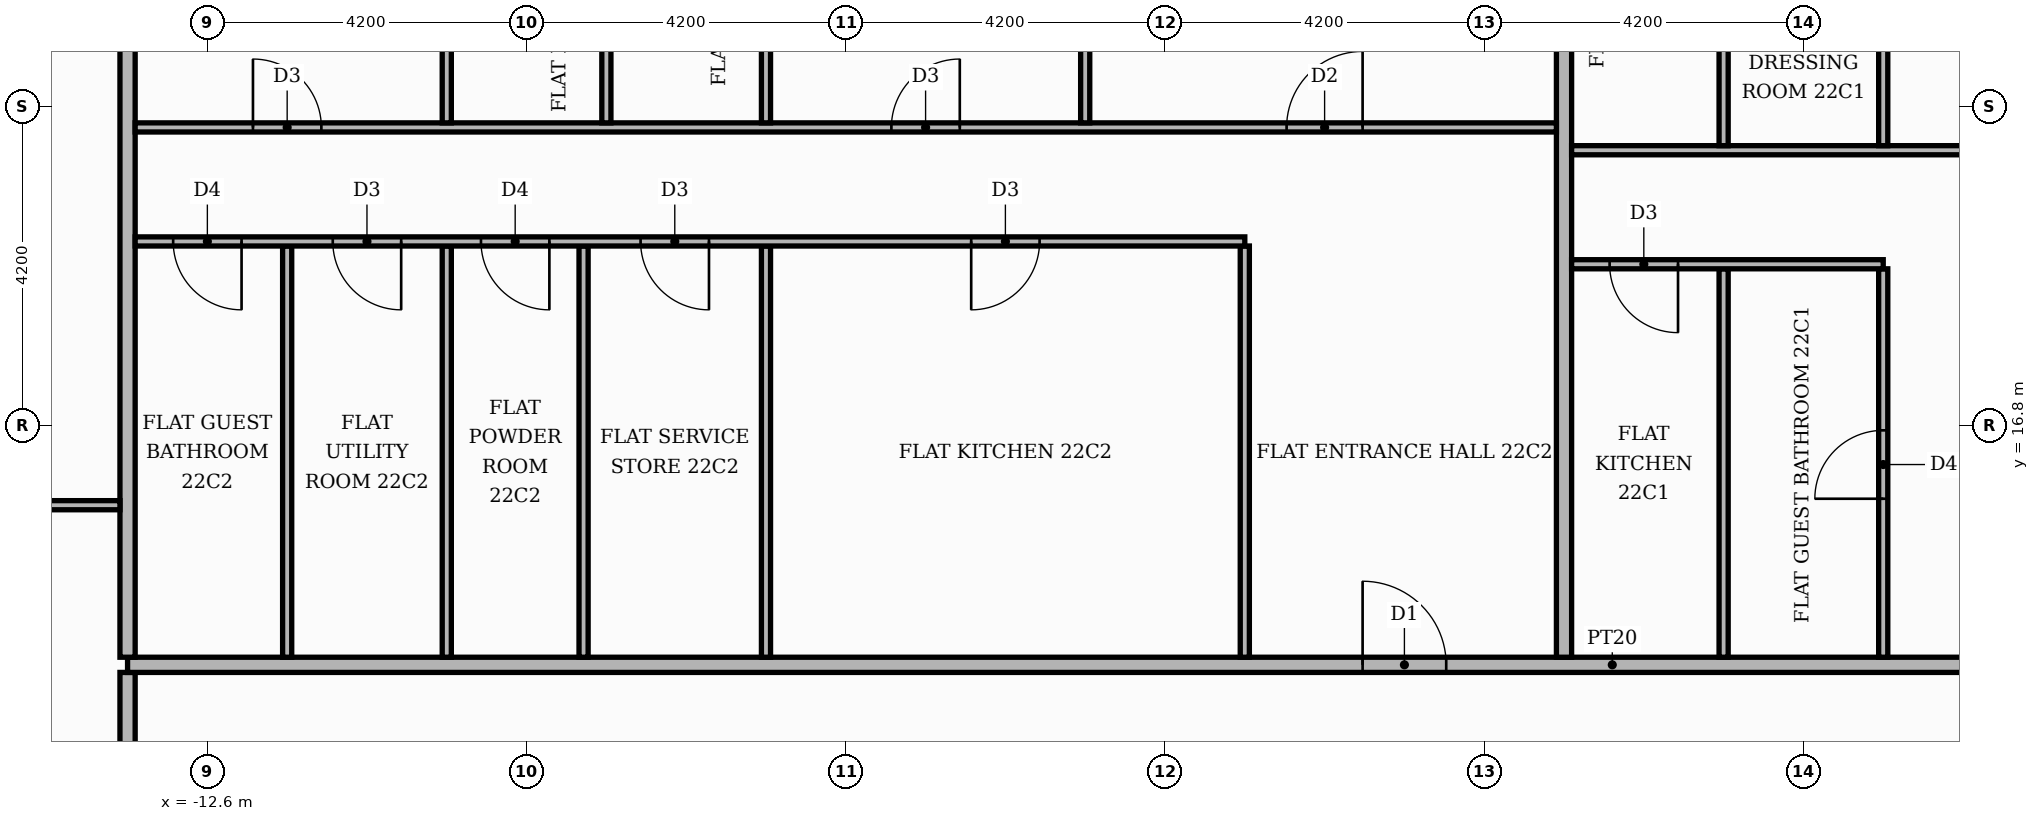
"""IFC4 building model, lengths in metres.
Left out: names, types, materials, properties, quantities, classifications, styles, units other than length and angle.
Written with IfcOpenShell. Run it as: python <this file> out.ifc"""

import sys

from ifc_helpers import new_model, si_unit, direction, frame, frame_2d, origin, place, context, subcontext, project, spatial, rectangle, extrude, element, fill, save


model = new_model("IFC4")
c1 = context("Model", 3, precision=1e-05, world=origin(), true_north=direction((0.0, 1.0)))
c2 = subcontext(c1, "Body", "Model", "MODEL_VIEW")
j1 = project(units=[si_unit("LENGTHUNIT", "METRE"), si_unit("PLANEANGLEUNIT", "RADIAN")], contexts=[c1])
p1 = place(None, origin())
s1 = spatial("IfcSite", under=j1, at=p1, CompositionType="ELEMENT")
p2 = place(p1, origin())
s2 = spatial("IfcBuilding", under=s1, at=p2, CompositionType="ELEMENT")
p3 = place(p2, frame((0.0, 0.0, 94.8)))
s3 = spatial("IfcBuildingStorey", under=s2, at=p3, CompositionType="ELEMENT", Elevation=94.8)
p4 = place(p3, frame((-13.65, -13.55, 0.0), z_axis=(0.0, 0.0, 1.0), x_axis=(0.0, 1.0, 0.0)))
e1 = element("IfcWall", 1, at=p4, inside=s3, PredefinedType="PARTITIONING", context=c2, shape_type="SweptSolid", body=[
    extrude(rectangle(XDim=27.1, YDim=0.2, at=frame_2d((13.55, 0.0))), origin(), (0.0, 0.0, 1.0), 3.48),
])
p5 = place(p4, frame((24.55, 0.0, 0.0)))
e2 = element("IfcOpeningElement", 2, at=p5, cuts=e1, PredefinedType="OPENING", context=c2, shape_type="SweptSolid", body=[
    extrude(rectangle(XDim=1.1, YDim=2.4, at=frame_2d((0.55, 1.2))), frame((0.0, 0.11, 0.0), z_axis=(0.0, -1.0, 0.0), x_axis=(1.0, 0.0, 0.0)), (0.0, 0.0, 1.0), 0.22),
])
p6 = place(p3, frame((-13.65, 13.65, 0.0), z_axis=(0.0, 0.0, 1.0), x_axis=(1.0, 0.0, 0.0)))
e3 = element("IfcWall", 3, at=p6, inside=s3, PredefinedType="PARTITIONING", context=c2, shape_type="SweptSolid", body=[
    extrude(rectangle(XDim=39.07, YDim=0.2, at=frame_2d((19.535, 0.0))), origin(), (0.0, 0.0, 1.0), 3.48),
])
p7 = place(p6, frame((24.65, 0.0, 0.0)))
e4 = element("IfcOpeningElement", 4, at=p7, cuts=e3, PredefinedType="OPENING", context=c2, shape_type="SweptSolid", body=[
    extrude(rectangle(XDim=1.1, YDim=2.4, at=frame_2d((0.55, 1.2))), frame((0.0, 0.11, 0.0), z_axis=(0.0, -1.0, 0.0), x_axis=(1.0, 0.0, 0.0)), (0.0, 0.0, 1.0), 0.22),
])
p8 = place(p6, frame((16.25, 0.0, 0.0)))
e5 = element("IfcOpeningElement", 5, at=p8, cuts=e3, PredefinedType="OPENING", context=c2, shape_type="SweptSolid", body=[
    extrude(rectangle(XDim=1.1, YDim=2.4, at=frame_2d((0.55, 1.2))), frame((0.0, 0.11, 0.0), z_axis=(0.0, -1.0, 0.0), x_axis=(1.0, 0.0, 0.0)), (0.0, 0.0, 1.0), 0.22),
])
p9 = place(p3, frame((-13.65, 13.75, 0.0), z_axis=(0.0, 0.0, 1.0), x_axis=(0.0, 1.0, 0.0)))
e6 = element("IfcWall", 6, at=p9, inside=s3, PredefinedType="PARTITIONING", context=c2, shape_type="SweptSolid", body=[
    extrude(rectangle(XDim=11.67, YDim=0.2, at=frame_2d((5.835, 0.0))), origin(), (0.0, 0.0, 1.0), 3.48),
])
for number, where, z_axis, x_axis in (
    (7, (-11.55, 13.75, 0.0), (0.0, 0.0, 1.0), (0.0, 1.0, 0.0)),
    (8, (-9.45, 13.75, 0.0), (0.0, 0.0, 1.0), (0.0, 1.0, 0.0)),
    (9, (-7.65, 13.75, 0.0), (0.0, 0.0, 1.0), (0.0, 1.0, 0.0)),
    (10, (-5.25, 13.75, 0.0), (0.0, 0.0, 1.0), (0.0, 1.0, 0.0)),
    (11, (1.05, 13.75, 0.0), (0.0, 0.0, 1.0), (0.0, 1.0, 0.0)),
):
    element("IfcWall", number, at=place(p3, frame(where, z_axis=z_axis, x_axis=x_axis)), inside=s3, PredefinedType="PARTITIONING", context=c2, shape_type="SweptSolid", body=[
        extrude(rectangle(XDim=5.41, YDim=0.12, at=frame_2d((2.705, 0.0))), origin(), (0.0, 0.0, 1.0), 3.48),
    ])
p10 = place(p3, frame((5.25, 13.75, 0.0), z_axis=(0.0, 0.0, 1.0), x_axis=(0.0, 1.0, 0.0)))
e12 = element("IfcWall", 12, at=p10, inside=s3, PredefinedType="PARTITIONING", context=c2, shape_type="SweptSolid", body=[
    extrude(rectangle(XDim=11.67, YDim=0.2, at=frame_2d((5.835, 0.0))), origin(), (0.0, 0.0, 1.0), 3.48),
])
p11 = place(p3, frame((7.35, 13.75, 0.0), z_axis=(0.0, 0.0, 1.0), x_axis=(0.0, 1.0, 0.0)))
e13 = element("IfcWall", 13, at=p11, inside=s3, PredefinedType="PARTITIONING", context=c2, shape_type="SweptSolid", body=[
    extrude(rectangle(XDim=5.11, YDim=0.12, at=frame_2d((2.555, 0.0))), origin(), (0.0, 0.0, 1.0), 3.48),
])
p12 = place(p3, frame((9.45, 13.75, 0.0), z_axis=(0.0, 0.0, 1.0), x_axis=(0.0, 1.0, 0.0)))
e14 = element("IfcWall", 14, at=p12, inside=s3, PredefinedType="PARTITIONING", context=c2, shape_type="SweptSolid", body=[
    extrude(rectangle(XDim=5.11, YDim=0.12, at=frame_2d((2.555, 0.0))), origin(), (0.0, 0.0, 1.0), 3.48),
])
p13 = place(p12, frame((2.085, 0.0, 0.0)))
e15 = element("IfcOpeningElement", 15, at=p13, cuts=e14, PredefinedType="OPENING", context=c2, shape_type="SweptSolid", body=[
    extrude(rectangle(XDim=0.9, YDim=2.1, at=frame_2d((0.45, 1.05))), frame((0.0, 0.07, 0.0), z_axis=(0.0, -1.0, 0.0), x_axis=(1.0, 0.0, 0.0)), (0.0, 0.0, 1.0), 0.14),
])
p14 = place(p3, frame((-20.42, 15.75, 0.0), z_axis=(0.0, 0.0, 1.0), x_axis=(1.0, 0.0, 0.0)))
e16 = element("IfcWall", 16, at=p14, inside=s3, PredefinedType="PARTITIONING", context=c2, shape_type="SweptSolid", body=[
    extrude(rectangle(XDim=6.67, YDim=0.12, at=frame_2d((3.335, 0.0))), origin(), (0.0, 0.0, 1.0), 3.48),
])
p15 = place(p14, frame((2.935, 0.0, 0.0)))
e17 = element("IfcOpeningElement", 17, at=p15, cuts=e16, PredefinedType="OPENING", context=c2, shape_type="SweptSolid", body=[
    extrude(rectangle(XDim=0.9, YDim=2.1, at=frame_2d((0.45, 1.05))), frame((0.0, 0.07, 0.0), z_axis=(0.0, -1.0, 0.0), x_axis=(1.0, 0.0, 0.0)), (0.0, 0.0, 1.0), 0.14),
])
p16 = place(p3, frame((5.35, 18.92, 0.0), z_axis=(0.0, 0.0, 1.0), x_axis=(1.0, 0.0, 0.0)))
e18 = element("IfcWall", 18, at=p16, inside=s3, PredefinedType="PARTITIONING", context=c2, shape_type="SweptSolid", body=[
    extrude(rectangle(XDim=4.1, YDim=0.12, at=frame_2d((2.05, 0.0))), origin(), (0.0, 0.0, 1.0), 3.48),
])
p17 = place(p16, frame((0.5, 0.0, 0.0)))
e19 = element("IfcOpeningElement", 19, at=p17, cuts=e18, PredefinedType="OPENING", context=c2, shape_type="SweptSolid", body=[
    extrude(rectangle(XDim=0.9, YDim=2.1, at=frame_2d((0.45, 1.05))), frame((0.0, 0.07, 0.0), z_axis=(0.0, -1.0, 0.0), x_axis=(1.0, 0.0, 0.0)), (0.0, 0.0, 1.0), 0.14),
])
p18 = place(p3, frame((-13.55, 19.22, 0.0), z_axis=(0.0, 0.0, 1.0), x_axis=(1.0, 0.0, 0.0)))
e20 = element("IfcWall", 20, at=p18, inside=s3, PredefinedType="PARTITIONING", context=c2, shape_type="SweptSolid", body=[
    extrude(rectangle(XDim=14.6, YDim=0.12, at=frame_2d((7.3, 0.0))), origin(), (0.0, 0.0, 1.0), 3.48),
])
p19 = place(p18, frame((11.0, 0.0, 0.0)))
e21 = element("IfcOpeningElement", 21, at=p19, cuts=e20, PredefinedType="OPENING", context=c2, shape_type="SweptSolid", body=[
    extrude(rectangle(XDim=0.9, YDim=2.1, at=frame_2d((0.45, 1.05))), frame((0.0, 0.07, 0.0), z_axis=(0.0, -1.0, 0.0), x_axis=(1.0, 0.0, 0.0)), (0.0, 0.0, 1.0), 0.14),
])
p20 = place(p18, frame((6.65, 0.0, 0.0)))
e22 = element("IfcOpeningElement", 22, at=p20, cuts=e20, PredefinedType="OPENING", context=c2, shape_type="SweptSolid", body=[
    extrude(rectangle(XDim=0.9, YDim=2.1, at=frame_2d((0.45, 1.05))), frame((0.0, 0.07, 0.0), z_axis=(0.0, -1.0, 0.0), x_axis=(1.0, 0.0, 0.0)), (0.0, 0.0, 1.0), 0.14),
])
p21 = place(p18, frame((4.55, 0.0, 0.0)))
e23 = element("IfcOpeningElement", 23, at=p21, cuts=e20, PredefinedType="OPENING", context=c2, shape_type="SweptSolid", body=[
    extrude(rectangle(XDim=0.9, YDim=2.1, at=frame_2d((0.45, 1.05))), frame((0.0, 0.07, 0.0), z_axis=(0.0, -1.0, 0.0), x_axis=(1.0, 0.0, 0.0)), (0.0, 0.0, 1.0), 0.14),
])
p22 = place(p18, frame((2.6, 0.0, 0.0)))
e24 = element("IfcOpeningElement", 24, at=p22, cuts=e20, PredefinedType="OPENING", context=c2, shape_type="SweptSolid", body=[
    extrude(rectangle(XDim=0.9, YDim=2.1, at=frame_2d((0.45, 1.05))), frame((0.0, 0.07, 0.0), z_axis=(0.0, -1.0, 0.0), x_axis=(1.0, 0.0, 0.0)), (0.0, 0.0, 1.0), 0.14),
])
p23 = place(p18, frame((0.5, 0.0, 0.0)))
e25 = element("IfcOpeningElement", 25, at=p23, cuts=e20, PredefinedType="OPENING", context=c2, shape_type="SweptSolid", body=[
    extrude(rectangle(XDim=0.9, YDim=2.1, at=frame_2d((0.45, 1.05))), frame((0.0, 0.07, 0.0), z_axis=(0.0, -1.0, 0.0), x_axis=(1.0, 0.0, 0.0)), (0.0, 0.0, 1.0), 0.14),
])
p24 = place(p3, frame((5.35, 20.42, 0.0), z_axis=(0.0, 0.0, 1.0), x_axis=(1.0, 0.0, 0.0)))
e26 = element("IfcWall", 26, at=p24, inside=s3, PredefinedType="PARTITIONING", context=c2, shape_type="SweptSolid", body=[
    extrude(rectangle(XDim=20.07, YDim=0.12, at=frame_2d((10.035, 0.0))), origin(), (0.0, 0.0, 1.0), 3.48),
])
p25 = place(p24, frame((8.85, 0.0, 0.0)))
e27 = element("IfcOpeningElement", 27, at=p25, cuts=e26, PredefinedType="OPENING", context=c2, shape_type="SweptSolid", body=[
    extrude(rectangle(XDim=1.0, YDim=2.1, at=frame_2d((0.5, 1.05))), frame((0.0, 0.07, 0.0), z_axis=(0.0, -1.0, 0.0), x_axis=(1.0, 0.0, 0.0)), (0.0, 0.0, 1.0), 0.14),
])
p26 = place(p24, frame((5.75, 0.0, 0.0)))
e28 = element("IfcOpeningElement", 28, at=p26, cuts=e26, PredefinedType="OPENING", context=c2, shape_type="SweptSolid", body=[
    extrude(rectangle(XDim=0.9, YDim=2.1, at=frame_2d((0.45, 1.05))), frame((0.0, 0.07, 0.0), z_axis=(0.0, -1.0, 0.0), x_axis=(1.0, 0.0, 0.0)), (0.0, 0.0, 1.0), 0.14),
])
p27 = place(p3, frame((7.35, 20.48, 0.0), z_axis=(0.0, 0.0, 1.0), x_axis=(0.0, 1.0, 0.0)))
e29 = element("IfcWall", 29, at=p27, inside=s3, PredefinedType="PARTITIONING", context=c2, shape_type="SweptSolid", body=[
    extrude(rectangle(XDim=4.94, YDim=0.12, at=frame_2d((2.47, 0.0))), origin(), (0.0, 0.0, 1.0), 3.48),
])
p28 = place(p27, frame((2.14, 0.0, 0.0)))
e30 = element("IfcOpeningElement", 30, at=p28, cuts=e29, PredefinedType="OPENING", context=c2, shape_type="SweptSolid", body=[
    extrude(rectangle(XDim=0.9, YDim=2.1, at=frame_2d((0.45, 1.05))), frame((0.0, 0.07, 0.0), z_axis=(0.0, -1.0, 0.0), x_axis=(1.0, 0.0, 0.0)), (0.0, 0.0, 1.0), 0.14),
])
p29 = place(p3, frame((9.45, 20.48, 0.0), z_axis=(0.0, 0.0, 1.0), x_axis=(0.0, 1.0, 0.0)))
e31 = element("IfcWall", 31, at=p29, inside=s3, PredefinedType="PARTITIONING", context=c2, shape_type="SweptSolid", body=[
    extrude(rectangle(XDim=4.94, YDim=0.12, at=frame_2d((2.47, 0.0))), origin(), (0.0, 0.0, 1.0), 3.48),
])
p30 = place(p29, frame((2.14, 0.0, 0.0)))
e32 = element("IfcOpeningElement", 32, at=p30, cuts=e31, PredefinedType="OPENING", context=c2, shape_type="SweptSolid", body=[
    extrude(rectangle(XDim=0.9, YDim=2.1, at=frame_2d((0.45, 1.05))), frame((0.0, 0.07, 0.0), z_axis=(0.0, -1.0, 0.0), x_axis=(1.0, 0.0, 0.0)), (0.0, 0.0, 1.0), 0.14),
])
p31 = place(p3, frame((-13.55, 20.72, 0.0), z_axis=(0.0, 0.0, 1.0), x_axis=(1.0, 0.0, 0.0)))
e33 = element("IfcWall", 33, at=p31, inside=s3, PredefinedType="PARTITIONING", context=c2, shape_type="SweptSolid", body=[
    extrude(rectangle(XDim=18.7, YDim=0.12, at=frame_2d((9.35, 0.0))), origin(), (0.0, 0.0, 1.0), 3.48),
])
p32 = place(p31, frame((15.15, 0.0, 0.0)))
e34 = element("IfcOpeningElement", 34, at=p32, cuts=e33, PredefinedType="OPENING", context=c2, shape_type="SweptSolid", body=[
    extrude(rectangle(XDim=1.0, YDim=2.1, at=frame_2d((0.5, 1.05))), frame((0.0, 0.07, 0.0), z_axis=(0.0, -1.0, 0.0), x_axis=(1.0, 0.0, 0.0)), (0.0, 0.0, 1.0), 0.14),
])
p33 = place(p31, frame((9.95, 0.0, 0.0)))
e35 = element("IfcOpeningElement", 35, at=p33, cuts=e33, PredefinedType="OPENING", context=c2, shape_type="SweptSolid", body=[
    extrude(rectangle(XDim=0.9, YDim=2.1, at=frame_2d((0.45, 1.05))), frame((0.0, 0.07, 0.0), z_axis=(0.0, -1.0, 0.0), x_axis=(1.0, 0.0, 0.0)), (0.0, 0.0, 1.0), 0.14),
])
p34 = place(p31, frame((1.55, 0.0, 0.0)))
e36 = element("IfcOpeningElement", 36, at=p34, cuts=e33, PredefinedType="OPENING", context=c2, shape_type="SweptSolid", body=[
    extrude(rectangle(XDim=0.9, YDim=2.1, at=frame_2d((0.45, 1.05))), frame((0.0, 0.07, 0.0), z_axis=(0.0, -1.0, 0.0), x_axis=(1.0, 0.0, 0.0)), (0.0, 0.0, 1.0), 0.14),
])
p35 = place(p3, frame((-9.45, 20.78, 0.0), z_axis=(0.0, 0.0, 1.0), x_axis=(0.0, 1.0, 0.0)))
e37 = element("IfcWall", 37, at=p35, inside=s3, PredefinedType="PARTITIONING", context=c2, shape_type="SweptSolid", body=[
    extrude(rectangle(XDim=4.64, YDim=0.12, at=frame_2d((2.32, 0.0))), origin(), (0.0, 0.0, 1.0), 3.48),
])
p36 = place(p3, frame((-7.35, 20.78, 0.0), z_axis=(0.0, 0.0, 1.0), x_axis=(0.0, 1.0, 0.0)))
e38 = element("IfcWall", 38, at=p36, inside=s3, PredefinedType="PARTITIONING", context=c2, shape_type="SweptSolid", body=[
    extrude(rectangle(XDim=4.64, YDim=0.12, at=frame_2d((2.32, 0.0))), origin(), (0.0, 0.0, 1.0), 3.48),
])
p37 = place(p36, frame((1.99, 0.0, 0.0)))
e39 = element("IfcOpeningElement", 39, at=p37, cuts=e38, PredefinedType="OPENING", context=c2, shape_type="SweptSolid", body=[
    extrude(rectangle(XDim=0.9, YDim=2.1, at=frame_2d((0.45, 1.05))), frame((0.0, 0.07, 0.0), z_axis=(0.0, -1.0, 0.0), x_axis=(1.0, 0.0, 0.0)), (0.0, 0.0, 1.0), 0.14),
])
p38 = place(p3, frame((-5.25, 20.78, 0.0), z_axis=(0.0, 0.0, 1.0), x_axis=(0.0, 1.0, 0.0)))
e40 = element("IfcWall", 40, at=p38, inside=s3, PredefinedType="PARTITIONING", context=c2, shape_type="SweptSolid", body=[
    extrude(rectangle(XDim=4.64, YDim=0.12, at=frame_2d((2.32, 0.0))), origin(), (0.0, 0.0, 1.0), 3.48),
])
p39 = place(p38, frame((1.99, 0.0, 0.0)))
e41 = element("IfcOpeningElement", 41, at=p39, cuts=e40, PredefinedType="OPENING", context=c2, shape_type="SweptSolid", body=[
    extrude(rectangle(XDim=0.9, YDim=2.1, at=frame_2d((0.45, 1.05))), frame((0.0, 0.07, 0.0), z_axis=(0.0, -1.0, 0.0), x_axis=(1.0, 0.0, 0.0)), (0.0, 0.0, 1.0), 0.14),
])
p40 = place(p3, frame((-1.05, 20.78, 0.0), z_axis=(0.0, 0.0, 1.0), x_axis=(0.0, 1.0, 0.0)))
e42 = element("IfcWall", 42, at=p40, inside=s3, PredefinedType="PARTITIONING", context=c2, shape_type="SweptSolid", body=[
    extrude(rectangle(XDim=4.64, YDim=0.12, at=frame_2d((2.32, 0.0))), origin(), (0.0, 0.0, 1.0), 3.48),
])
p41 = place(p13, origin())
e43 = element("IfcDoor", 43, at=p41, inside=s3, OperationType="SINGLE_SWING_LEFT", PredefinedType="DOOR", context=c2, shape_type="SweptSolid", body=[
    extrude(rectangle(XDim=0.9, YDim=2.1, at=frame_2d((0.45, 1.05))), frame((0.0, 0.025, 0.0), z_axis=(0.0, -1.0, 0.0), x_axis=(1.0, 0.0, 0.0)), (0.0, 0.0, 1.0), 0.05),
])
fill(e15, e43)
p42 = place(p17, frame((0.9, 0.0, 0.0), z_axis=(0.0, 0.0, 1.0), x_axis=(-1.0, 0.0, 0.0)))
e44 = element("IfcDoor", 44, at=p42, inside=s3, OperationType="SINGLE_SWING_RIGHT", PredefinedType="DOOR", context=c2, shape_type="SweptSolid", body=[
    extrude(rectangle(XDim=0.9, YDim=2.1, at=frame_2d((0.45, 1.05))), frame((0.0, 0.025, 0.0), z_axis=(0.0, -1.0, 0.0), x_axis=(1.0, 0.0, 0.0)), (0.0, 0.0, 1.0), 0.05),
])
fill(e19, e44)
p43 = place(p8, origin())
e45 = element("IfcDoor", 45, at=p43, inside=s3, OperationType="SINGLE_SWING_LEFT", PredefinedType="DOOR", context=c2, shape_type="SweptSolid", body=[
    extrude(rectangle(XDim=1.1, YDim=2.4, at=frame_2d((0.55, 1.2))), frame((0.0, 0.025, 0.0), z_axis=(0.0, -1.0, 0.0), x_axis=(1.0, 0.0, 0.0)), (0.0, 0.0, 1.0), 0.05),
])
fill(e5, e45)
p44 = place(p19, frame((0.9, 0.0, 0.0), z_axis=(0.0, 0.0, 1.0), x_axis=(-1.0, 0.0, 0.0)))
e46 = element("IfcDoor", 46, at=p44, inside=s3, OperationType="SINGLE_SWING_LEFT", PredefinedType="DOOR", context=c2, shape_type="SweptSolid", body=[
    extrude(rectangle(XDim=0.9, YDim=2.1, at=frame_2d((0.45, 1.05))), frame((0.0, 0.025, 0.0), z_axis=(0.0, -1.0, 0.0), x_axis=(1.0, 0.0, 0.0)), (0.0, 0.0, 1.0), 0.05),
])
fill(e21, e46)
p45 = place(p20, frame((0.9, 0.0, 0.0), z_axis=(0.0, 0.0, 1.0), x_axis=(-1.0, 0.0, 0.0)))
e47 = element("IfcDoor", 47, at=p45, inside=s3, OperationType="SINGLE_SWING_RIGHT", PredefinedType="DOOR", context=c2, shape_type="SweptSolid", body=[
    extrude(rectangle(XDim=0.9, YDim=2.1, at=frame_2d((0.45, 1.05))), frame((0.0, 0.025, 0.0), z_axis=(0.0, -1.0, 0.0), x_axis=(1.0, 0.0, 0.0)), (0.0, 0.0, 1.0), 0.05),
])
fill(e22, e47)
p46 = place(p21, frame((0.9, 0.0, 0.0), z_axis=(0.0, 0.0, 1.0), x_axis=(-1.0, 0.0, 0.0)))
e48 = element("IfcDoor", 48, at=p46, inside=s3, OperationType="SINGLE_SWING_RIGHT", PredefinedType="DOOR", context=c2, shape_type="SweptSolid", body=[
    extrude(rectangle(XDim=0.9, YDim=2.1, at=frame_2d((0.45, 1.05))), frame((0.0, 0.025, 0.0), z_axis=(0.0, -1.0, 0.0), x_axis=(1.0, 0.0, 0.0)), (0.0, 0.0, 1.0), 0.05),
])
fill(e23, e48)
p47 = place(p22, frame((0.9, 0.0, 0.0), z_axis=(0.0, 0.0, 1.0), x_axis=(-1.0, 0.0, 0.0)))
e49 = element("IfcDoor", 49, at=p47, inside=s3, OperationType="SINGLE_SWING_RIGHT", PredefinedType="DOOR", context=c2, shape_type="SweptSolid", body=[
    extrude(rectangle(XDim=0.9, YDim=2.1, at=frame_2d((0.45, 1.05))), frame((0.0, 0.025, 0.0), z_axis=(0.0, -1.0, 0.0), x_axis=(1.0, 0.0, 0.0)), (0.0, 0.0, 1.0), 0.05),
])
fill(e24, e49)
p48 = place(p23, frame((0.9, 0.0, 0.0), z_axis=(0.0, 0.0, 1.0), x_axis=(-1.0, 0.0, 0.0)))
e50 = element("IfcDoor", 50, at=p48, inside=s3, OperationType="SINGLE_SWING_RIGHT", PredefinedType="DOOR", context=c2, shape_type="SweptSolid", body=[
    extrude(rectangle(XDim=0.9, YDim=2.1, at=frame_2d((0.45, 1.05))), frame((0.0, 0.025, 0.0), z_axis=(0.0, -1.0, 0.0), x_axis=(1.0, 0.0, 0.0)), (0.0, 0.0, 1.0), 0.05),
])
fill(e25, e50)
p49 = place(p32, origin())
e51 = element("IfcDoor", 51, at=p49, inside=s3, OperationType="SINGLE_SWING_RIGHT", PredefinedType="DOOR", context=c2, shape_type="SweptSolid", body=[
    extrude(rectangle(XDim=1.0, YDim=2.1, at=frame_2d((0.5, 1.05))), frame((0.0, 0.025, 0.0), z_axis=(0.0, -1.0, 0.0), x_axis=(1.0, 0.0, 0.0)), (0.0, 0.0, 1.0), 0.05),
])
fill(e34, e51)
p50 = place(p33, origin())
e52 = element("IfcDoor", 52, at=p50, inside=s3, OperationType="SINGLE_SWING_RIGHT", PredefinedType="DOOR", context=c2, shape_type="SweptSolid", body=[
    extrude(rectangle(XDim=0.9, YDim=2.1, at=frame_2d((0.45, 1.05))), frame((0.0, 0.025, 0.0), z_axis=(0.0, -1.0, 0.0), x_axis=(1.0, 0.0, 0.0)), (0.0, 0.0, 1.0), 0.05),
])
fill(e35, e52)
p51 = place(p34, origin())
e53 = element("IfcDoor", 53, at=p51, inside=s3, OperationType="SINGLE_SWING_LEFT", PredefinedType="DOOR", context=c2, shape_type="SweptSolid", body=[
    extrude(rectangle(XDim=0.9, YDim=2.1, at=frame_2d((0.45, 1.05))), frame((0.0, 0.025, 0.0), z_axis=(0.0, -1.0, 0.0), x_axis=(1.0, 0.0, 0.0)), (0.0, 0.0, 1.0), 0.05),
])
fill(e36, e53)
save(model, sys.argv[1])
